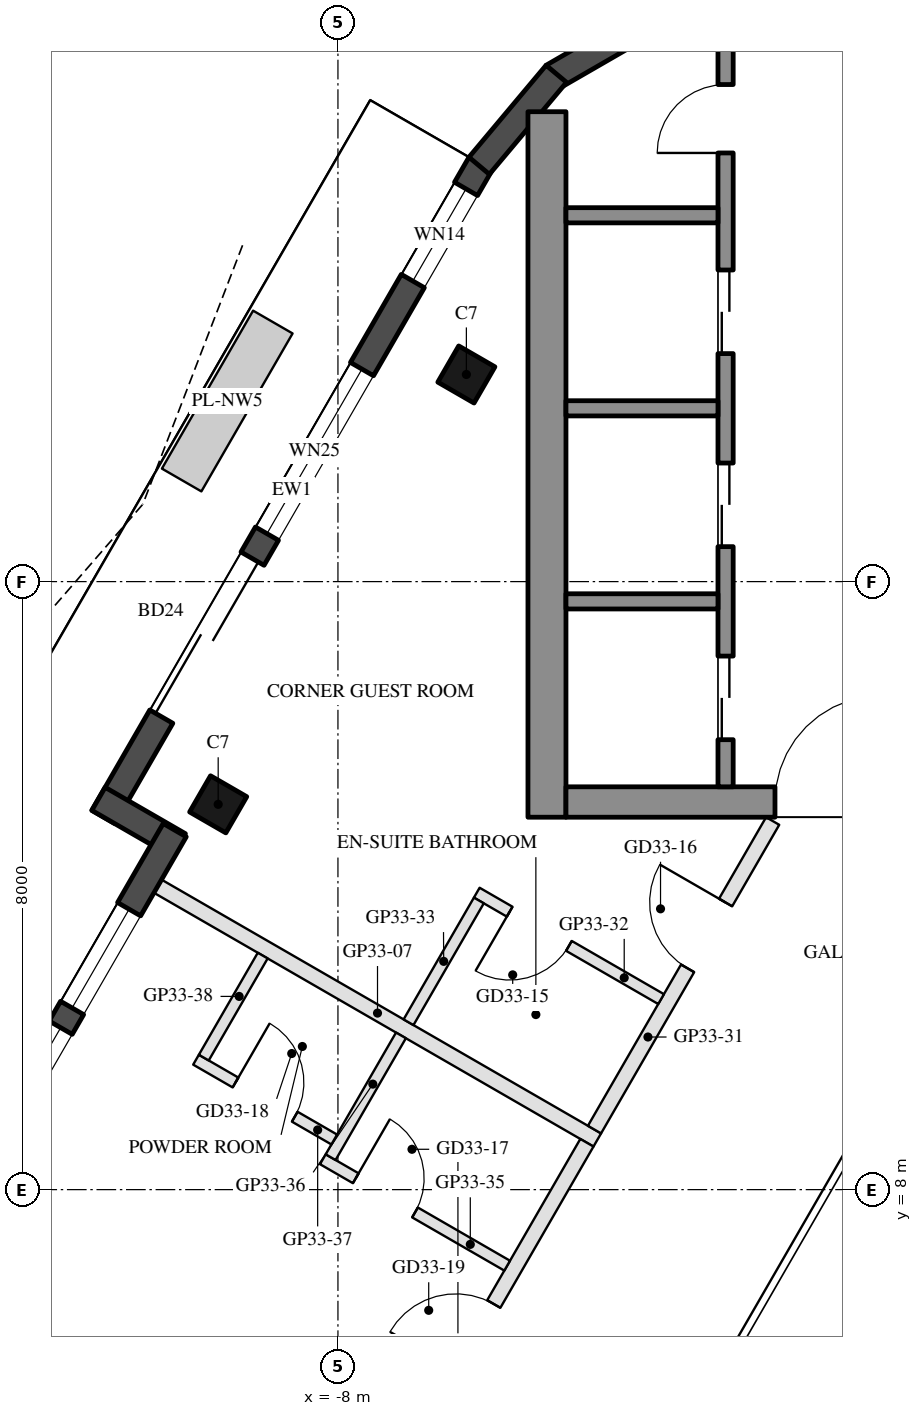
"""IFC4 building model, lengths in metres.
Left out: names, types, materials, properties, quantities, classifications, styles, units other than length and angle.
Written with IfcOpenShell. Run it as: python <this file> out.ifc"""

import sys

from ifc_helpers import new_model, si_unit, direction, frame, frame_2d, origin, origin_2d, place, context, subcontext, project, spatial, rectangle, hollow_rectangle, extrude, boolean, halfspace, element, fill, save


model = new_model("IFC4")
c1 = context("Model", 3, precision=1e-05, world=origin(), true_north=direction((0.0, 1.0)))
c2 = subcontext(c1, "Body", "Model", "MODEL_VIEW")
j1 = project(units=[si_unit("LENGTHUNIT", "METRE"), si_unit("PLANEANGLEUNIT", "RADIAN")], contexts=[c1])
p1 = place(None, origin())
s1 = spatial("IfcSite", under=j1, at=p1, CompositionType="ELEMENT")
p2 = place(p1, origin())
s2 = spatial("IfcBuilding", under=s1, at=p2, CompositionType="ELEMENT")
p3 = place(p2, frame((0.0, 0.0, 313.3)))
s3 = spatial("IfcBuildingStorey", under=s2, at=p3, CompositionType="ELEMENT", Elevation=313.3)
p4 = place(p3, frame((-6.31, 18.725, 0.0), z_axis=(0.0, 0.0, 1.0), x_axis=(0.5, 0.866025403784, 0.0)))
e1 = element("IfcColumn", 1, at=p4, inside=s3, PredefinedType="COLUMN", context=c2, shape_type="SweptSolid", body=[
    boolean("DIFFERENCE", extrude(hollow_rectangle(XDim=0.55, YDim=0.55, WallThickness=0.025, at=origin_2d()), origin(), (0.0, 0.0, 1.0), 3.7), halfspace(frame((0.0, 0.0, 0.04), z_axis=(0.0, 0.0, 1.0), x_axis=(1.0, 0.0, 0.0)), True)),
])
p5 = place(p3, frame((-9.576, 13.07, 0.0), z_axis=(0.0, 0.0, 1.0), x_axis=(0.5, 0.866025403784, 0.0)))
e2 = element("IfcColumn", 2, at=p5, inside=s3, PredefinedType="COLUMN", context=c2, shape_type="SweptSolid", body=[
    boolean("DIFFERENCE", extrude(hollow_rectangle(XDim=0.55, YDim=0.55, WallThickness=0.025, at=origin_2d()), origin(), (0.0, 0.0, 1.0), 3.7), halfspace(frame((0.0, 0.0, 0.034), z_axis=(0.0, 0.0, 1.0), x_axis=(1.0, 0.0, 0.0)), True)),
])
p6 = place(p3, frame((-6.125, 21.497, 0.0), z_axis=(0.0, 0.0, 1.0), x_axis=(-0.500002137087, -0.866024169933, 0.0)))
e3 = element("IfcWall", 3, at=p6, inside=s3, PredefinedType="SOLIDWALL", context=c2, shape_type="SweptSolid", body=[
    extrude(rectangle(XDim=9.924, YDim=0.35, at=frame_2d((4.962, 0.0))), origin(), (0.0, 0.0, 1.0), 3.55),
])
p7 = place(p6, frame((0.381, 0.0, 0.3)))
e4 = element("IfcOpeningElement", 4, at=p7, cuts=e3, PredefinedType="OPENING", context=c2, shape_type="SweptSolid", body=[
    extrude(rectangle(XDim=1.4, YDim=2.65, at=frame_2d((0.7, 1.325))), frame((0.0, 0.185, 0.0), z_axis=(0.0, -1.0, 0.0), x_axis=(1.0, 0.0, 0.0)), (0.0, 0.0, 1.0), 0.37),
])
p8 = place(p6, frame((5.999, 0.0, 0.0)))
e5 = element("IfcOpeningElement", 5, at=p8, cuts=e3, PredefinedType="OPENING", context=c2, shape_type="SweptSolid", body=[
    extrude(rectangle(XDim=2.4, YDim=2.4, at=frame_2d((1.2, 1.2))), frame((0.0, 0.185, 0.0), z_axis=(0.0, -1.0, 0.0), x_axis=(1.0, 0.0, 0.0)), (0.0, 0.0, 1.0), 0.37),
])
p9 = place(p6, frame((3.118, 0.0, 0.3)))
e6 = element("IfcOpeningElement", 6, at=p9, cuts=e3, PredefinedType="OPENING", context=c2, shape_type="SweptSolid", body=[
    extrude(rectangle(XDim=2.5, YDim=2.65, at=frame_2d((1.25, 1.325))), frame((0.0, 0.185, 0.0), z_axis=(0.0, -1.0, 0.0), x_axis=(1.0, 0.0, 0.0)), (0.0, 0.0, 1.0), 0.37),
])
p10 = place(p3, frame((-11.151, 13.142, 0.0), z_axis=(0.0, 0.0, 1.0), x_axis=(0.866005645448, -0.500034220881, 0.0)))
e7 = element("IfcWall", 7, at=p10, inside=s3, PredefinedType="SOLIDWALL", context=c2, shape_type="SweptSolid", body=[
    extrude(rectangle(XDim=1.22, YDim=0.35, at=frame_2d((0.61, 0.0))), origin(), (0.0, 0.0, 1.0), 3.55),
])
p11 = place(p3, frame((-10.147, 12.73, 0.0), z_axis=(0.0, 0.0, 1.0), x_axis=(-0.499996591357, -0.866027371756, 0.0)))
e8 = element("IfcWall", 8, at=p11, inside=s3, PredefinedType="SOLIDWALL", context=c2, shape_type="SweptSolid", body=[
    extrude(rectangle(XDim=5.371, YDim=0.35, at=frame_2d((2.685, 0.0))), origin(), (0.0, 0.0, 1.0), 3.55),
])
p12 = place(p11, frame((1.201, 0.0, 0.3)))
e9 = element("IfcOpeningElement", 9, at=p12, cuts=e8, PredefinedType="OPENING", context=c2, shape_type="SweptSolid", body=[
    extrude(rectangle(XDim=1.5, YDim=2.65, at=frame_2d((0.75, 1.325))), frame((0.0, 0.185, 0.0), z_axis=(0.0, -1.0, 0.0), x_axis=(1.0, 0.0, 0.0)), (0.0, 0.0, 1.0), 0.37),
])
p13 = place(p11, frame((3.001, 0.0, 0.3)))
e10 = element("IfcOpeningElement", 10, at=p13, cuts=e8, PredefinedType="OPENING", context=c2, shape_type="SweptSolid", body=[
    extrude(rectangle(XDim=1.5, YDim=2.65, at=frame_2d((0.75, 1.325))), frame((0.0, 0.185, 0.0), z_axis=(0.0, -1.0, 0.0), x_axis=(1.0, 0.0, 0.0)), (0.0, 0.0, 1.0), 0.37),
])
for number, where, z_axis, x_axis in (
    (11, (-3.806, 23.432, 0.0), (0.0, 0.0, 1.0), (-0.866, -0.5, 0.0)),
    (12, (-5.127, 22.681, 0.0), (0.0, 0.0, 1.0), (-0.643, -0.766, 0.0)),
):
    element("IfcWall", number, at=place(p3, frame(where, z_axis=z_axis, x_axis=x_axis)), inside=s3, PredefinedType="SOLIDWALL", context=c2, shape_type="SweptSolid", body=[
        extrude(rectangle(XDim=1.579, YDim=0.35, at=frame_2d((0.79, 0.0))), origin(), (0.0, 0.0, 1.0), 3.55),
    ])
p14 = place(p3, frame((-5.25, 12.9, 0.0), z_axis=(0.0, 0.0, 1.0), x_axis=(0.0, 1.0, 0.0)))
e13 = element("IfcWall", 13, at=p14, inside=s3, PredefinedType="SHEAR", context=c2, shape_type="SweptSolid", body=[
    extrude(rectangle(XDim=9.283, YDim=0.5, at=frame_2d((4.641, 0.0))), origin(), (0.0, 0.0, 1.0), 3.5),
])
p15 = place(p3, frame((5.0, 13.1, 0.0), z_axis=(0.0, 0.0, 1.0), x_axis=(-1.0, 0.0, 0.0)))
e14 = element("IfcWall", 14, at=p15, inside=s3, PredefinedType="SHEAR", context=c2, shape_type="SweptSolid", body=[
    extrude(rectangle(XDim=10.0, YDim=0.4, at=frame_2d((5.0, 0.0))), origin(), (0.0, 0.0, 1.0), 3.5),
])
p16 = place(p15, frame((3.55, 0.0, 0.0)))
e15 = element("IfcOpeningElement", 15, at=p16, cuts=e14, PredefinedType="OPENING", context=c2, shape_type="SweptSolid", body=[
    extrude(rectangle(XDim=1.1, YDim=2.1, at=frame_2d((0.55, 1.05))), frame((0.0, 0.21, 0.0), z_axis=(0.0, -1.0, 0.0), x_axis=(1.0, 0.0, 0.0)), (0.0, 0.0, 1.0), 0.42),
])
p17 = place(p15, frame((5.85, 0.0, 0.0)))
e16 = element("IfcOpeningElement", 16, at=p17, cuts=e14, PredefinedType="OPENING", context=c2, shape_type="SweptSolid", body=[
    extrude(rectangle(XDim=1.4, YDim=2.1, at=frame_2d((0.7, 1.05))), frame((0.0, 0.21, 0.0), z_axis=(0.0, -1.0, 0.0), x_axis=(1.0, 0.0, 0.0)), (0.0, 0.0, 1.0), 0.42),
])
p18 = place(p3, frame((-2.9, 13.3, 0.0), z_axis=(0.0, 0.0, 1.0), x_axis=(0.0, 1.0, 0.0)))
e17 = element("IfcWall", 17, at=p18, inside=s3, PredefinedType="SHEAR", context=c2, shape_type="SweptSolid", body=[
    extrude(rectangle(XDim=10.121, YDim=0.2, at=frame_2d((5.061, 0.0))), origin(), (0.0, 0.0, 1.0), 3.5),
])
p19 = place(p18, frame((0.62, 0.0, 0.0)))
e18 = element("IfcOpeningElement", 18, at=p19, cuts=e17, PredefinedType="OPENING", context=c2, shape_type="SweptSolid", body=[
    extrude(rectangle(XDim=1.1, YDim=2.1, at=frame_2d((0.55, 1.05))), frame((0.0, 0.11, 0.0), z_axis=(0.0, -1.0, 0.0), x_axis=(1.0, 0.0, 0.0)), (0.0, 0.0, 1.0), 0.22),
])
p20 = place(p18, frame((3.16, 0.0, 0.0)))
e19 = element("IfcOpeningElement", 19, at=p20, cuts=e17, PredefinedType="OPENING", context=c2, shape_type="SweptSolid", body=[
    extrude(rectangle(XDim=1.1, YDim=2.1, at=frame_2d((0.55, 1.05))), frame((0.0, 0.11, 0.0), z_axis=(0.0, -1.0, 0.0), x_axis=(1.0, 0.0, 0.0)), (0.0, 0.0, 1.0), 0.22),
])
p21 = place(p18, frame((5.7, 0.0, 0.0)))
e20 = element("IfcOpeningElement", 20, at=p21, cuts=e17, PredefinedType="OPENING", context=c2, shape_type="SweptSolid", body=[
    extrude(rectangle(XDim=1.1, YDim=2.1, at=frame_2d((0.55, 1.05))), frame((0.0, 0.11, 0.0), z_axis=(0.0, -1.0, 0.0), x_axis=(1.0, 0.0, 0.0)), (0.0, 0.0, 1.0), 0.22),
])
p22 = place(p18, frame((8.34, 0.0, 0.0)))
e21 = element("IfcOpeningElement", 21, at=p22, cuts=e17, PredefinedType="OPENING", context=c2, shape_type="SweptSolid", body=[
    extrude(rectangle(XDim=0.9, YDim=2.1, at=frame_2d((0.45, 1.05))), frame((0.0, 0.11, 0.0), z_axis=(0.0, -1.0, 0.0), x_axis=(1.0, 0.0, 0.0)), (0.0, 0.0, 1.0), 0.22),
])
for number, where, z_axis, x_axis in (
    (22, (-3.0, 15.74, 0.0), (0.0, 0.0, 1.0), (-1.0, 0.0, 0.0)),
    (23, (-3.0, 18.28, 0.0), (0.0, 0.0, 1.0), (-1.0, 0.0, 0.0)),
    (24, (-3.0, 20.82, 0.0), (0.0, 0.0, 1.0), (-1.0, 0.0, 0.0)),
):
    element("IfcWall", number, at=place(p3, frame(where, z_axis=z_axis, x_axis=x_axis)), inside=s3, PredefinedType="SHEAR", context=c2, shape_type="SweptSolid", body=[
        extrude(rectangle(XDim=2.0, YDim=0.2, at=frame_2d((1.0, 0.0))), origin(), (0.0, 0.0, 1.0), 3.5),
    ])
p23 = place(p3, frame((-10.371, 11.992, 0.0), z_axis=(0.0, 0.0, 1.0), x_axis=(0.866020588255, -0.50000834065, 0.0)))
e25 = element("IfcWall", 25, at=p23, inside=s3, PredefinedType="PARTITIONING", context=c2, shape_type="SweptSolid", body=[
    extrude(rectangle(XDim=6.678, YDim=0.2, at=frame_2d((3.339, 0.0))), origin(), (0.0, 0.0, 1.0), 3.16),
])
p24 = place(p3, frame((-4.625, 8.79, 0.0), z_axis=(0.0, 0.0, 1.0), x_axis=(0.499964368059, 0.866045974918, 0.0)))
e26 = element("IfcWall", 26, at=p24, inside=s3, PredefinedType="PARTITIONING", context=c2, shape_type="SweptSolid", body=[
    extrude(rectangle(XDim=4.688, YDim=0.2, at=frame_2d((2.344, 0.0))), origin(), (0.0, 0.0, 1.0), 3.1),
])
p25 = place(p24, frame((2.45, 0.0, 0.0)))
e27 = element("IfcOpeningElement", 27, at=p25, cuts=e26, PredefinedType="OPENING", context=c2, shape_type="SweptSolid", body=[
    extrude(rectangle(XDim=1.0, YDim=2.1, at=frame_2d((0.5, 1.05))), frame((0.0, 0.11, 0.0), z_axis=(0.0, -1.0, 0.0), x_axis=(1.0, 0.0, 0.0)), (0.0, 0.0, 1.0), 0.22),
])
p26 = place(p3, frame((-3.749, 10.507, 0.0), z_axis=(0.0, 0.0, 1.0), x_axis=(-0.866034573852, 0.49998411664, 0.0)))
e28 = element("IfcWall", 28, at=p26, inside=s3, PredefinedType="PARTITIONING", context=c2, shape_type="SweptSolid", body=[
    extrude(rectangle(XDim=2.8, YDim=0.15, at=frame_2d((1.4, 0.0))), origin(), (0.0, 0.0, 1.0), 3.55),
])
p27 = place(p26, frame((1.4, 0.0, 0.0)))
e29 = element("IfcOpeningElement", 29, at=p27, cuts=e28, PredefinedType="OPENING", context=c2, shape_type="SweptSolid", body=[
    extrude(rectangle(XDim=0.9, YDim=2.1, at=frame_2d((0.45, 1.05))), frame((0.0, 0.085, 0.0), z_axis=(0.0, -1.0, 0.0), x_axis=(1.0, 0.0, 0.0)), (0.0, 0.0, 1.0), 0.17),
])
p28 = place(p3, frame((-6.146, 11.805, 0.0), z_axis=(0.0, 0.0, 1.0), x_axis=(-0.499985172903, -0.866033964044, 0.0)))
e30 = element("IfcWall", 30, at=p28, inside=s3, PredefinedType="PARTITIONING", context=c2, shape_type="SweptSolid", body=[
    extrude(rectangle(XDim=1.85, YDim=0.15, at=frame_2d((0.925, 0.0))), origin(), (0.0, 0.0, 1.0), 3.1),
])
p29 = place(p3, frame((-9.815, -0.2, 0.0), z_axis=(0.0, 0.0, 1.0), x_axis=(0.499995091154, 0.866028237889, 0.0)))
e31 = element("IfcWall", 31, at=p29, inside=s3, PredefinedType="PARTITIONING", context=c2, shape_type="SweptSolid", body=[
    extrude(rectangle(XDim=10.18, YDim=0.2, at=frame_2d((5.09, 0.0))), origin(), (0.0, 0.0, 1.0), 3.1),
])
p30 = place(p29, frame((6.73, 0.0, 0.0)))
e32 = element("IfcOpeningElement", 32, at=p30, cuts=e31, PredefinedType="OPENING", context=c2, shape_type="SweptSolid", body=[
    extrude(rectangle(XDim=1.0, YDim=2.1, at=frame_2d((0.5, 1.05))), frame((0.0, 0.11, 0.0), z_axis=(0.0, -1.0, 0.0), x_axis=(1.0, 0.0, 0.0)), (0.0, 0.0, 1.0), 0.22),
])
p31 = place(p3, frame((-8.198, 8.4, 0.0), z_axis=(0.0, 0.0, 1.0), x_axis=(0.865996816683, -0.500049511043, 0.0)))
e33 = element("IfcWall", 33, at=p31, inside=s3, PredefinedType="PARTITIONING", context=c2, shape_type="SweptSolid", body=[
    extrude(rectangle(XDim=2.8, YDim=0.15, at=frame_2d((1.4, 0.0))), origin(), (0.0, 0.0, 1.0), 3.1),
])
p32 = place(p31, frame((0.5, 0.0, 0.0)))
e34 = element("IfcOpeningElement", 34, at=p32, cuts=e33, PredefinedType="OPENING", context=c2, shape_type="SweptSolid", body=[
    extrude(rectangle(XDim=0.9, YDim=2.1, at=frame_2d((0.45, 1.05))), frame((0.0, 0.085, 0.0), z_axis=(0.0, -1.0, 0.0), x_axis=(1.0, 0.0, 0.0)), (0.0, 0.0, 1.0), 0.17),
])
p33 = place(p3, frame((-7.171, 10.029, 0.0), z_axis=(0.0, 0.0, 1.0), x_axis=(-0.499985172903, -0.866033964044, 0.0)))
e35 = element("IfcWall", 35, at=p33, inside=s3, PredefinedType="PARTITIONING", context=c2, shape_type="SweptSolid", body=[
    extrude(rectangle(XDim=1.85, YDim=0.15, at=frame_2d((0.925, 0.0))), origin(), (0.0, 0.0, 1.0), 3.1),
])
p34 = place(p3, frame((-9.867, 9.709, 0.0), z_axis=(0.0, 0.0, 1.0), x_axis=(0.866009402589, -0.500027713859, 0.0)))
e36 = element("IfcWall", 36, at=p34, inside=s3, PredefinedType="PARTITIONING", context=c2, shape_type="SweptSolid", body=[
    extrude(rectangle(XDim=2.1, YDim=0.15, at=frame_2d((1.05, 0.0))), origin(), (0.0, 0.0, 1.0), 3.55),
])
p35 = place(p34, frame((0.6, 0.0, 0.0)))
e37 = element("IfcOpeningElement", 37, at=p35, cuts=e36, PredefinedType="OPENING", context=c2, shape_type="SweptSolid", body=[
    extrude(rectangle(XDim=0.9, YDim=2.1, at=frame_2d((0.45, 1.05))), frame((0.0, 0.085, 0.0), z_axis=(0.0, -1.0, 0.0), x_axis=(1.0, 0.0, 0.0)), (0.0, 0.0, 1.0), 0.17),
])
p36 = place(p3, frame((-8.99, 11.079, 0.0), z_axis=(0.0, 0.0, 1.0), x_axis=(-0.500086022567, -0.865975732936, 0.0)))
e38 = element("IfcWall", 38, at=p36, inside=s3, PredefinedType="PARTITIONING", context=c2, shape_type="SweptSolid", body=[
    extrude(rectangle(XDim=1.55, YDim=0.15, at=frame_2d((0.775, 0.0))), origin(), (0.0, 0.0, 1.0), 3.55),
])
p37 = place(p7, origin())
e39 = element("IfcWindow", 39, at=p37, inside=s3, PartitioningType="SINGLE_PANEL", PredefinedType="WINDOW", context=c2, shape_type="SweptSolid", body=[
    extrude(rectangle(XDim=1.4, YDim=2.65, at=frame_2d((0.7, 1.325))), frame((0.0, 0.03, 0.0), z_axis=(0.0, -1.0, 0.0), x_axis=(1.0, 0.0, 0.0)), (0.0, 0.0, 1.0), 0.06),
])
fill(e4, e39)
p38 = place(p8, frame((2.4, 0.0, 0.0), z_axis=(0.0, 0.0, 1.0), x_axis=(-1.0, 0.0, 0.0)))
e40 = element("IfcDoor", 40, at=p38, inside=s3, OperationType="SLIDING_TO_LEFT", PredefinedType="DOOR", context=c2, shape_type="SweptSolid", body=[
    extrude(rectangle(XDim=2.4, YDim=2.4, at=frame_2d((1.2, 1.2))), frame((0.0, 0.025, 0.0), z_axis=(0.0, -1.0, 0.0), x_axis=(1.0, 0.0, 0.0)), (0.0, 0.0, 1.0), 0.05),
])
fill(e5, e40)
p39 = place(p9, origin())
e41 = element("IfcWindow", 41, at=p39, inside=s3, PartitioningType="SINGLE_PANEL", PredefinedType="WINDOW", context=c2, shape_type="SweptSolid", body=[
    extrude(rectangle(XDim=2.5, YDim=2.65, at=frame_2d((1.25, 1.325))), frame((0.0, 0.03, 0.0), z_axis=(0.0, -1.0, 0.0), x_axis=(1.0, 0.0, 0.0)), (0.0, 0.0, 1.0), 0.06),
])
fill(e6, e41)
p40 = place(p12, origin())
e42 = element("IfcWindow", 42, at=p40, inside=s3, PartitioningType="SINGLE_PANEL", PredefinedType="WINDOW", context=c2, shape_type="SweptSolid", body=[
    extrude(rectangle(XDim=1.5, YDim=2.65, at=frame_2d((0.75, 1.325))), frame((0.0, 0.03, 0.0), z_axis=(0.0, -1.0, 0.0), x_axis=(1.0, 0.0, 0.0)), (0.0, 0.0, 1.0), 0.06),
])
fill(e9, e42)
p41 = place(p13, origin())
e43 = element("IfcWindow", 43, at=p41, inside=s3, PartitioningType="SINGLE_PANEL", PredefinedType="WINDOW", context=c2, shape_type="SweptSolid", body=[
    extrude(rectangle(XDim=1.5, YDim=2.65, at=frame_2d((0.75, 1.325))), frame((0.0, 0.03, 0.0), z_axis=(0.0, -1.0, 0.0), x_axis=(1.0, 0.0, 0.0)), (0.0, 0.0, 1.0), 0.06),
])
fill(e10, e43)
p42 = place(p19, origin())
e44 = element("IfcDoor", 44, at=p42, inside=s3, OperationType="DOUBLE_DOOR_SLIDING", PredefinedType="DOOR", context=c2, shape_type="SweptSolid", body=[
    extrude(rectangle(XDim=1.1, YDim=2.1, at=frame_2d((0.55, 1.05))), frame((0.0, 0.025, 0.0), z_axis=(0.0, -1.0, 0.0), x_axis=(1.0, 0.0, 0.0)), (0.0, 0.0, 1.0), 0.05),
])
fill(e18, e44)
p43 = place(p20, origin())
e45 = element("IfcDoor", 45, at=p43, inside=s3, OperationType="DOUBLE_DOOR_SLIDING", PredefinedType="DOOR", context=c2, shape_type="SweptSolid", body=[
    extrude(rectangle(XDim=1.1, YDim=2.1, at=frame_2d((0.55, 1.05))), frame((0.0, 0.025, 0.0), z_axis=(0.0, -1.0, 0.0), x_axis=(1.0, 0.0, 0.0)), (0.0, 0.0, 1.0), 0.05),
])
fill(e19, e45)
p44 = place(p21, origin())
e46 = element("IfcDoor", 46, at=p44, inside=s3, OperationType="DOUBLE_DOOR_SLIDING", PredefinedType="DOOR", context=c2, shape_type="SweptSolid", body=[
    extrude(rectangle(XDim=1.1, YDim=2.1, at=frame_2d((0.55, 1.05))), frame((0.0, 0.025, 0.0), z_axis=(0.0, -1.0, 0.0), x_axis=(1.0, 0.0, 0.0)), (0.0, 0.0, 1.0), 0.05),
])
fill(e20, e46)
p45 = place(p22, origin())
e47 = element("IfcDoor", 47, at=p45, inside=s3, OperationType="SINGLE_SWING_LEFT", PredefinedType="DOOR", context=c2, shape_type="SweptSolid", body=[
    extrude(rectangle(XDim=0.9, YDim=2.1, at=frame_2d((0.45, 1.05))), frame((0.0, 0.025, 0.0), z_axis=(0.0, -1.0, 0.0), x_axis=(1.0, 0.0, 0.0)), (0.0, 0.0, 1.0), 0.05),
])
fill(e21, e47)
p46 = place(p17, frame((1.4, 0.0, 0.0), z_axis=(0.0, 0.0, 1.0), x_axis=(-1.0, 0.0, 0.0)))
e48 = element("IfcDoor", 48, at=p46, inside=s3, OperationType="DOUBLE_DOOR_SINGLE_SWING", PredefinedType="DOOR", context=c2, shape_type="SweptSolid", body=[
    extrude(rectangle(XDim=1.4, YDim=2.1, at=frame_2d((0.7, 1.05))), frame((0.0, 0.025, 0.0), z_axis=(0.0, -1.0, 0.0), x_axis=(1.0, 0.0, 0.0)), (0.0, 0.0, 1.0), 0.05),
])
fill(e16, e48)
p47 = place(p27, origin())
e49 = element("IfcDoor", 49, at=p47, inside=s3, OperationType="SINGLE_SWING_RIGHT", PredefinedType="DOOR", context=c2, shape_type="SweptSolid", body=[
    extrude(rectangle(XDim=0.9, YDim=2.1, at=frame_2d((0.45, 1.05))), frame((0.0, 0.025, 0.0), z_axis=(0.0, -1.0, 0.0), x_axis=(1.0, 0.0, 0.0)), (0.0, 0.0, 1.0), 0.05),
])
fill(e29, e49)
p48 = place(p25, origin())
e50 = element("IfcDoor", 50, at=p48, inside=s3, OperationType="SINGLE_SWING_RIGHT", PredefinedType="DOOR", context=c2, shape_type="SweptSolid", body=[
    extrude(rectangle(XDim=1.0, YDim=2.1, at=frame_2d((0.5, 1.05))), frame((0.0, 0.025, 0.0), z_axis=(0.0, -1.0, 0.0), x_axis=(1.0, 0.0, 0.0)), (0.0, 0.0, 1.0), 0.05),
])
fill(e27, e50)
p49 = place(p32, origin())
e51 = element("IfcDoor", 51, at=p49, inside=s3, OperationType="SINGLE_SWING_LEFT", PredefinedType="DOOR", context=c2, shape_type="SweptSolid", body=[
    extrude(rectangle(XDim=0.9, YDim=2.1, at=frame_2d((0.45, 1.05))), frame((0.0, 0.025, 0.0), z_axis=(0.0, -1.0, 0.0), x_axis=(1.0, 0.0, 0.0)), (0.0, 0.0, 1.0), 0.05),
])
fill(e34, e51)
p50 = place(p35, origin())
e52 = element("IfcDoor", 52, at=p50, inside=s3, OperationType="SINGLE_SWING_LEFT", PredefinedType="DOOR", context=c2, shape_type="SweptSolid", body=[
    extrude(rectangle(XDim=0.9, YDim=2.1, at=frame_2d((0.45, 1.05))), frame((0.0, 0.025, 0.0), z_axis=(0.0, -1.0, 0.0), x_axis=(1.0, 0.0, 0.0)), (0.0, 0.0, 1.0), 0.05),
])
fill(e37, e52)
p51 = place(p30, origin())
e53 = element("IfcDoor", 53, at=p51, inside=s3, OperationType="SINGLE_SWING_LEFT", PredefinedType="DOOR", context=c2, shape_type="SweptSolid", body=[
    extrude(rectangle(XDim=1.0, YDim=2.1, at=frame_2d((0.5, 1.05))), frame((0.0, 0.025, 0.0), z_axis=(0.0, -1.0, 0.0), x_axis=(1.0, 0.0, 0.0)), (0.0, 0.0, 1.0), 0.05),
])
fill(e32, e53)
save(model, sys.argv[1])
